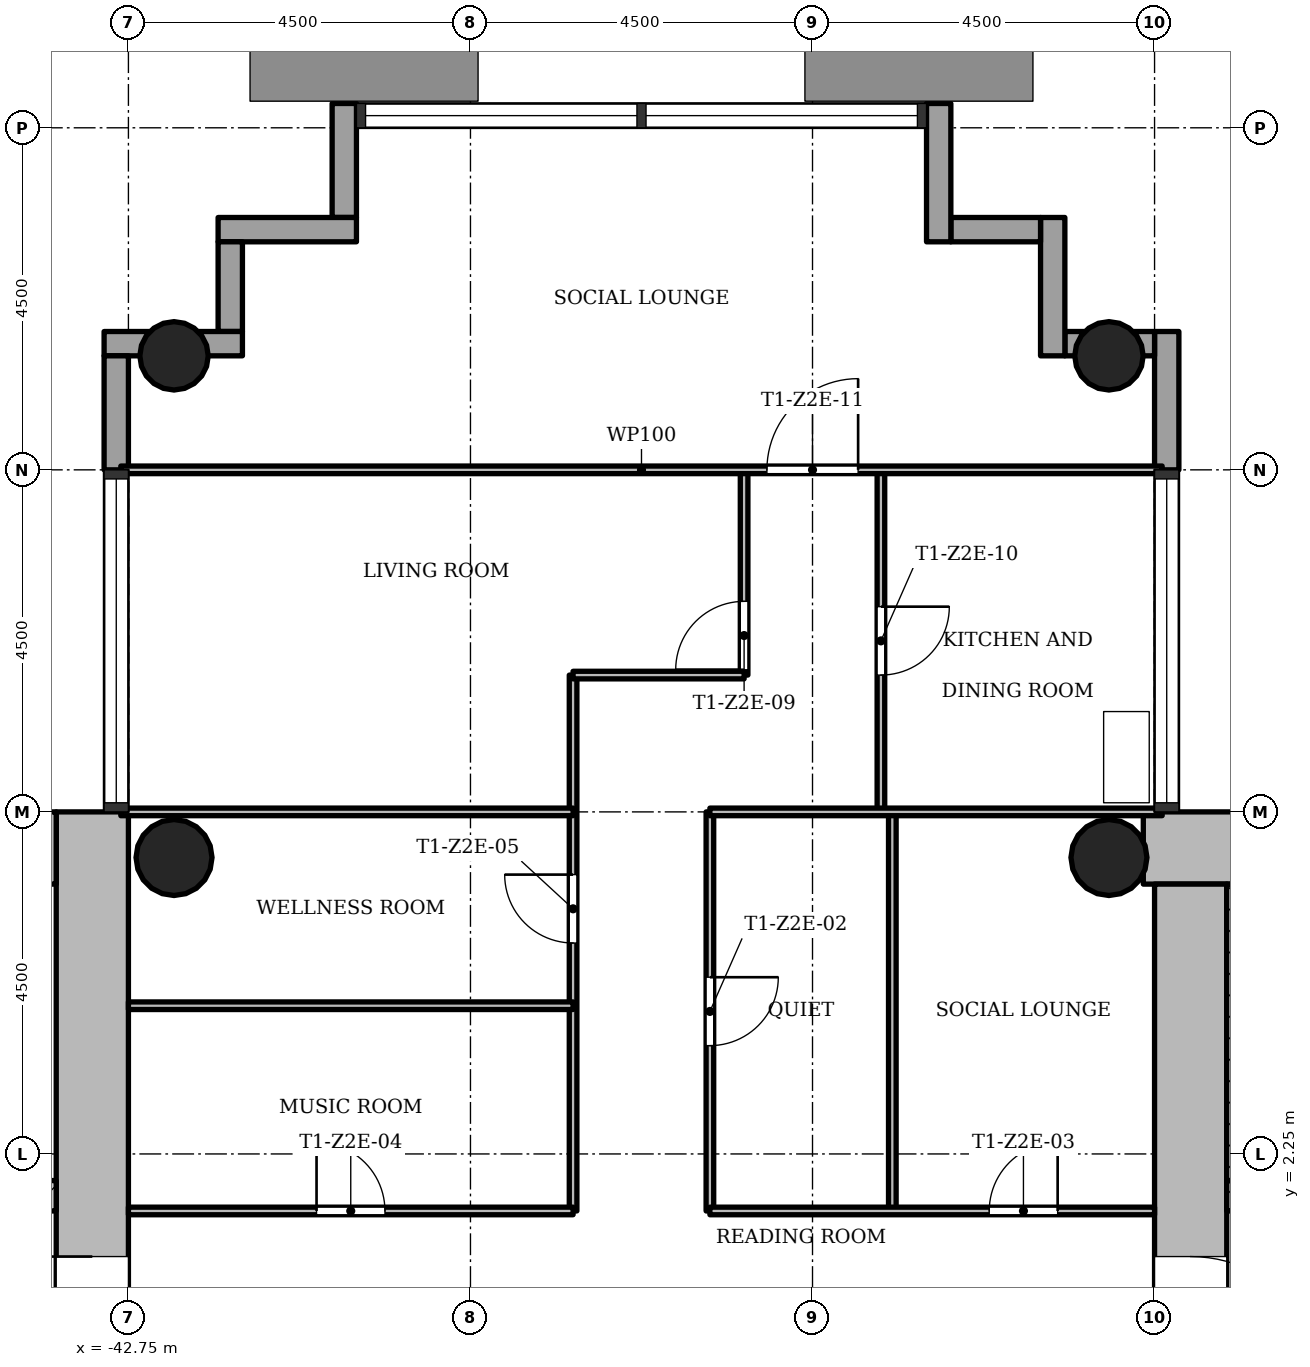
"""IFC4 building model, lengths in metres.
Left out: names, types, materials, properties, quantities, classifications, styles, units other than length and angle.
Written with IfcOpenShell. Run it as: python <this file> out.ifc"""

import sys

from ifc_helpers import new_model, si_unit, direction, frame, frame_2d, origin, origin_2d, place, context, subcontext, project, spatial, rectangle, hollow_circle, extrude, element, fill, save


model = new_model("IFC4")
c1 = context("Model", 3, precision=1e-05, world=origin(), true_north=direction((0.0, 1.0)))
c2 = subcontext(c1, "Body", "Model", "MODEL_VIEW")
j1 = project(units=[si_unit("LENGTHUNIT", "METRE"), si_unit("PLANEANGLEUNIT", "RADIAN")], contexts=[c1])
p1 = place(None, origin())
s1 = spatial("IfcSite", under=j1, at=p1, CompositionType="ELEMENT")
p2 = place(p1, origin())
s2 = spatial("IfcBuilding", under=s1, at=p2, CompositionType="ELEMENT")
p3 = place(p2, frame((0.0, 0.0, 100.4)))
s3 = spatial("IfcBuildingStorey", under=s2, at=p3, CompositionType="ELEMENT", Elevation=100.4)
p4 = place(p3, frame((-20.702, 6.275, 0.0), z_axis=(0.0, 0.0, 1.0), x_axis=(-1.0, 0.0, 0.0)))
e1 = element("IfcWall", 1, at=p4, inside=s3, PredefinedType="SHEAR", context=c2, shape_type="SweptSolid", body=[
    extrude(rectangle(XDim=8.696, YDim=0.95, at=frame_2d((4.348, 0.0))), origin(), (0.0, 0.0, 1.0), 3.4),
])
p5 = place(p3, frame((-28.775, 5.8, 0.0), z_axis=(0.0, 0.0, 1.0), x_axis=(0.0, -1.0, 0.0)))
e2 = element("IfcWall", 2, at=p5, inside=s3, PredefinedType="SHEAR", context=c2, shape_type="SweptSolid", body=[
    extrude(rectangle(XDim=12.55, YDim=0.95, at=frame_2d((6.275, 0.0))), origin(), (0.0, 0.0, 1.0), 3.4),
])
p6 = place(p5, frame((4.9, 0.0, 0.0)))
e3 = element("IfcOpeningElement", 3, at=p6, cuts=e2, PredefinedType="OPENING", context=c2, shape_type="SweptSolid", body=[
    extrude(rectangle(XDim=1.8, YDim=2.1, at=frame_2d((0.9, 1.05))), frame((0.0, 0.485, 0.0), z_axis=(0.0, -1.0, 0.0), x_axis=(1.0, 0.0, 0.0)), (0.0, 0.0, 1.0), 0.97),
])
p7 = place(p3, frame((-28.3, 1.7, 0.0), z_axis=(0.0, 0.0, 1.0), x_axis=(1.0, 0.0, 0.0)))
e4 = element("IfcWall", 4, at=p7, inside=s3, PredefinedType="SHEAR", context=c2, shape_type="SweptSolid", body=[
    extrude(rectangle(XDim=7.1, YDim=0.4, at=frame_2d((3.55, 0.0))), origin(), (0.0, 0.0, 1.0), 3.4),
])
p8 = place(p7, frame((0.7, 0.0, 0.0)))
e5 = element("IfcOpeningElement", 5, at=p8, cuts=e4, PredefinedType="OPENING", context=c2, shape_type="SweptSolid", body=[
    extrude(rectangle(XDim=0.9, YDim=2.1, at=frame_2d((0.45, 1.05))), frame((0.0, 0.21, 0.0), z_axis=(0.0, -1.0, 0.0), x_axis=(1.0, 0.0, 0.0)), (0.0, 0.0, 1.0), 0.42),
])
p9 = place(p3, frame((-43.225, -5.8, 0.0), z_axis=(0.0, 0.0, 1.0), x_axis=(0.0, 1.0, 0.0)))
e6 = element("IfcWall", 6, at=p9, inside=s3, PredefinedType="SHEAR", context=c2, shape_type="SweptSolid", body=[
    extrude(rectangle(XDim=12.55, YDim=0.95, at=frame_2d((6.275, 0.0))), origin(), (0.0, 0.0, 1.0), 3.4),
])
p10 = place(p9, frame((4.9, 0.0, 0.0)))
e7 = element("IfcOpeningElement", 7, at=p10, cuts=e6, PredefinedType="OPENING", context=c2, shape_type="SweptSolid", body=[
    extrude(rectangle(XDim=1.8, YDim=2.1, at=frame_2d((0.9, 1.05))), frame((0.0, 0.485, 0.0), z_axis=(0.0, -1.0, 0.0), x_axis=(1.0, 0.0, 0.0)), (0.0, 0.0, 1.0), 0.97),
])
p11 = place(p3, frame((-43.7, 6.275, 0.0), z_axis=(0.0, 0.0, 1.0), x_axis=(-1.0, 0.0, 0.0)))
e8 = element("IfcWall", 8, at=p11, inside=s3, PredefinedType="SHEAR", context=c2, shape_type="SweptSolid", body=[
    extrude(rectangle(XDim=8.05, YDim=0.95, at=frame_2d((4.025, 0.0))), origin(), (0.0, 0.0, 1.0), 3.4),
])
p12 = place(p3, frame((-50.8, 1.7, 0.0), z_axis=(0.0, 0.0, 1.0), x_axis=(1.0, 0.0, 0.0)))
e9 = element("IfcWall", 9, at=p12, inside=s3, PredefinedType="SHEAR", context=c2, shape_type="SweptSolid", body=[
    extrude(rectangle(XDim=7.1, YDim=0.4, at=frame_2d((3.55, 0.0))), origin(), (0.0, 0.0, 1.0), 3.4),
])
p13 = place(p12, frame((5.2, 0.0, 0.0)))
e10 = element("IfcOpeningElement", 10, at=p13, cuts=e9, PredefinedType="OPENING", context=c2, shape_type="SweptSolid", body=[
    extrude(rectangle(XDim=1.1, YDim=2.1, at=frame_2d((0.55, 1.05))), frame((0.0, 0.21, 0.0), z_axis=(0.0, -1.0, 0.0), x_axis=(1.0, 0.0, 0.0)), (0.0, 0.0, 1.0), 0.42),
])
for number, where, z_axis, x_axis in (
    (11, (-29.85, 12.75, 0.0), (0.0, 0.0, 1.0), (1.0, 0.0, 0.0)),
    (12, (-42.15, 12.75, 0.0), (0.0, 0.0, 1.0), (1.0, 0.0, 0.0)),
):
    element("IfcColumn", number, at=place(p3, frame(where, z_axis=z_axis, x_axis=x_axis)), inside=s3, PredefinedType="COLUMN", context=c2, shape_type="SweptSolid", body=[
        extrude(hollow_circle(Radius=0.45, WallThickness=0.032, at=origin_2d()), origin(), (0.0, 0.0, 1.0), 3.4),
    ])
for number, where, z_axis, x_axis in (
    (13, (-29.85, 6.15, 0.0), (0.0, 0.0, 1.0), (1.0, 0.0, 0.0)),
    (14, (-42.15, 6.15, 0.0), (0.0, 0.0, 1.0), (1.0, 0.0, 0.0)),
):
    element("IfcColumn", number, at=place(p3, frame(where, z_axis=z_axis, x_axis=x_axis)), inside=s3, PredefinedType="COLUMN", context=c2, shape_type="SweptSolid", body=[
        extrude(hollow_circle(Radius=0.5, WallThickness=0.036, at=origin_2d()), origin(), (0.0, 0.0, 1.0), 3.4),
    ])
p14 = place(p3, frame((-29.09, 11.25, -0.3), z_axis=(0.0, 0.0, 1.0), x_axis=(0.0, 1.0, 0.0)))
e15 = element("IfcWall", 15, at=p14, inside=s3, PredefinedType="STANDARD", context=c2, shape_type="SweptSolid", body=[
    extrude(rectangle(XDim=1.82, YDim=0.32, at=frame_2d((0.91, 0.0))), origin(), (0.0, 0.0, 1.0), 3.4),
])
p15 = place(p3, frame((-29.25, 12.91, -0.3), z_axis=(0.0, 0.0, 1.0), x_axis=(-1.0, 0.0, 0.0)))
e16 = element("IfcWall", 16, at=p15, inside=s3, PredefinedType="STANDARD", context=c2, shape_type="SweptSolid", body=[
    extrude(rectangle(XDim=1.18, YDim=0.32, at=frame_2d((0.59, 0.0))), origin(), (0.0, 0.0, 1.0), 3.4),
])
p16 = place(p3, frame((-30.59, 12.75, -0.3), z_axis=(0.0, 0.0, 1.0), x_axis=(0.0, 1.0, 0.0)))
e17 = element("IfcWall", 17, at=p16, inside=s3, PredefinedType="STANDARD", context=c2, shape_type="SweptSolid", body=[
    extrude(rectangle(XDim=1.82, YDim=0.32, at=frame_2d((0.91, 0.0))), origin(), (0.0, 0.0, 1.0), 3.4),
])
p17 = place(p3, frame((-30.75, 14.41, -0.3), z_axis=(0.0, 0.0, 1.0), x_axis=(-1.0, 0.0, 0.0)))
e18 = element("IfcWall", 18, at=p17, inside=s3, PredefinedType="STANDARD", context=c2, shape_type="SweptSolid", body=[
    extrude(rectangle(XDim=1.18, YDim=0.32, at=frame_2d((0.59, 0.0))), origin(), (0.0, 0.0, 1.0), 3.4),
])
p18 = place(p3, frame((-32.09, 14.25, -0.3), z_axis=(0.0, 0.0, 1.0), x_axis=(0.0, 1.0, 0.0)))
e19 = element("IfcWall", 19, at=p18, inside=s3, PredefinedType="STANDARD", context=c2, shape_type="SweptSolid", body=[
    extrude(rectangle(XDim=1.82, YDim=0.32, at=frame_2d((0.91, 0.0))), origin(), (0.0, 0.0, 1.0), 3.4),
])
p19 = place(p3, frame((-39.91, 16.07, -0.3), z_axis=(0.0, 0.0, 1.0), x_axis=(0.0, -1.0, 0.0)))
e20 = element("IfcWall", 20, at=p19, inside=s3, PredefinedType="STANDARD", context=c2, shape_type="SweptSolid", body=[
    extrude(rectangle(XDim=1.5, YDim=0.32, at=frame_2d((0.75, 0.0))), origin(), (0.0, 0.0, 1.0), 3.4),
])
p20 = place(p3, frame((-39.75, 14.41, -0.3), z_axis=(0.0, 0.0, 1.0), x_axis=(-1.0, 0.0, 0.0)))
e21 = element("IfcWall", 21, at=p20, inside=s3, PredefinedType="STANDARD", context=c2, shape_type="SweptSolid", body=[
    extrude(rectangle(XDim=1.82, YDim=0.32, at=frame_2d((0.91, 0.0))), origin(), (0.0, 0.0, 1.0), 3.4),
])
p21 = place(p3, frame((-41.41, 14.25, -0.3), z_axis=(0.0, 0.0, 1.0), x_axis=(0.0, -1.0, 0.0)))
e22 = element("IfcWall", 22, at=p21, inside=s3, PredefinedType="STANDARD", context=c2, shape_type="SweptSolid", body=[
    extrude(rectangle(XDim=1.18, YDim=0.32, at=frame_2d((0.59, 0.0))), origin(), (0.0, 0.0, 1.0), 3.4),
])
p22 = place(p3, frame((-41.25, 12.91, -0.3), z_axis=(0.0, 0.0, 1.0), x_axis=(-1.0, 0.0, 0.0)))
e23 = element("IfcWall", 23, at=p22, inside=s3, PredefinedType="STANDARD", context=c2, shape_type="SweptSolid", body=[
    extrude(rectangle(XDim=1.82, YDim=0.32, at=frame_2d((0.91, 0.0))), origin(), (0.0, 0.0, 1.0), 3.4),
])
p23 = place(p3, frame((-42.91, 12.75, -0.3), z_axis=(0.0, 0.0, 1.0), x_axis=(0.0, -1.0, 0.0)))
e24 = element("IfcWall", 24, at=p23, inside=s3, PredefinedType="STANDARD", context=c2, shape_type="SweptSolid", body=[
    extrude(rectangle(XDim=1.5, YDim=0.32, at=frame_2d((0.75, 0.0))), origin(), (0.0, 0.0, 1.0), 3.4),
])
p24 = place(p3, frame((-36.9, 1.5, 0.0), z_axis=(0.0, 0.0, 1.0), x_axis=(0.0, 1.0, 0.0)))
e25 = element("IfcWall", 25, at=p24, inside=s3, PredefinedType="PARTITIONING", context=c2, shape_type="SweptSolid", body=[
    extrude(rectangle(XDim=7.05, YDim=0.1, at=frame_2d((3.525, 0.0))), origin(), (0.0, 0.0, 1.0), 3.0),
])
p25 = place(p24, frame((3.525, 0.0, 0.0)))
e26 = element("IfcOpeningElement", 26, at=p25, cuts=e25, PredefinedType="OPENING", context=c2, shape_type="SweptSolid", body=[
    extrude(rectangle(XDim=0.9, YDim=2.1, at=frame_2d((0.45, 1.05))), frame((0.0, 0.06, 0.0), z_axis=(0.0, -1.0, 0.0), x_axis=(1.0, 0.0, 0.0)), (0.0, 0.0, 1.0), 0.12),
])
p26 = place(p3, frame((-35.1, 1.5, 0.0), z_axis=(0.0, 0.0, 1.0), x_axis=(0.0, 1.0, 0.0)))
e27 = element("IfcWall", 27, at=p26, inside=s3, PredefinedType="PARTITIONING", context=c2, shape_type="SweptSolid", body=[
    extrude(rectangle(XDim=5.25, YDim=0.1, at=frame_2d((2.625, 0.0))), origin(), (0.0, 0.0, 1.0), 3.0),
])
p27 = place(p26, frame((2.175, 0.0, 0.0)))
e28 = element("IfcOpeningElement", 28, at=p27, cuts=e27, PredefinedType="OPENING", context=c2, shape_type="SweptSolid", body=[
    extrude(rectangle(XDim=0.9, YDim=2.1, at=frame_2d((0.45, 1.05))), frame((0.0, 0.06, 0.0), z_axis=(0.0, -1.0, 0.0), x_axis=(1.0, 0.0, 0.0)), (0.0, 0.0, 1.0), 0.12),
])
p28 = place(p3, frame((-34.65, 8.55, 0.0), z_axis=(0.0, 0.0, 1.0), x_axis=(0.0, 1.0, 0.0)))
e29 = element("IfcWall", 29, at=p28, inside=s3, PredefinedType="PARTITIONING", context=c2, shape_type="SweptSolid", body=[
    extrude(rectangle(XDim=2.7, YDim=0.1, at=frame_2d((1.35, 0.0))), origin(), (0.0, 0.0, 1.0), 3.0),
])
p29 = place(p28, frame((0.07, 0.0, 0.0)))
e30 = element("IfcOpeningElement", 30, at=p29, cuts=e29, PredefinedType="OPENING", context=c2, shape_type="SweptSolid", body=[
    extrude(rectangle(XDim=0.9, YDim=2.1, at=frame_2d((0.45, 1.05))), frame((0.0, 0.06, 0.0), z_axis=(0.0, -1.0, 0.0), x_axis=(1.0, 0.0, 0.0)), (0.0, 0.0, 1.0), 0.12),
])
p30 = place(p3, frame((-32.85, 6.75, 0.0), z_axis=(0.0, 0.0, 1.0), x_axis=(0.0, 1.0, 0.0)))
e31 = element("IfcWall", 31, at=p30, inside=s3, PredefinedType="PARTITIONING", context=c2, shape_type="SweptSolid", body=[
    extrude(rectangle(XDim=4.5, YDim=0.1, at=frame_2d((2.25, 0.0))), origin(), (0.0, 0.0, 1.0), 3.0),
])
p31 = place(p30, frame((1.8, 0.0, 0.0)))
e32 = element("IfcOpeningElement", 32, at=p31, cuts=e31, PredefinedType="OPENING", context=c2, shape_type="SweptSolid", body=[
    extrude(rectangle(XDim=0.9, YDim=2.1, at=frame_2d((0.45, 1.05))), frame((0.0, 0.06, 0.0), z_axis=(0.0, -1.0, 0.0), x_axis=(1.0, 0.0, 0.0)), (0.0, 0.0, 1.0), 0.12),
])
p32 = place(p3, frame((-32.7, 1.5, 0.0), z_axis=(0.0, 0.0, 1.0), x_axis=(0.0, 1.0, 0.0)))
e33 = element("IfcWall", 33, at=p32, inside=s3, PredefinedType="PARTITIONING", context=c2, shape_type="SweptSolid", body=[
    extrude(rectangle(XDim=5.25, YDim=0.1, at=frame_2d((2.625, 0.0))), origin(), (0.0, 0.0, 1.0), 3.0),
])
p33 = place(p3, frame((-42.75, 1.5, 0.0), z_axis=(0.0, 0.0, 1.0), x_axis=(1.0, 0.0, 0.0)))
e34 = element("IfcWall", 34, at=p33, inside=s3, PredefinedType="PARTITIONING", context=c2, shape_type="SweptSolid", body=[
    extrude(rectangle(XDim=5.85, YDim=0.1, at=frame_2d((2.925, 0.0))), origin(), (0.0, 0.0, 1.0), 3.0),
])
p34 = place(p33, frame((2.475, 0.0, 0.0)))
e35 = element("IfcOpeningElement", 35, at=p34, cuts=e34, PredefinedType="OPENING", context=c2, shape_type="SweptSolid", body=[
    extrude(rectangle(XDim=0.9, YDim=2.1, at=frame_2d((0.45, 1.05))), frame((0.0, 0.06, 0.0), z_axis=(0.0, -1.0, 0.0), x_axis=(1.0, 0.0, 0.0)), (0.0, 0.0, 1.0), 0.12),
])
p35 = place(p3, frame((-35.1, 1.5, 0.0), z_axis=(0.0, 0.0, 1.0), x_axis=(1.0, 0.0, 0.0)))
e36 = element("IfcWall", 36, at=p35, inside=s3, PredefinedType="PARTITIONING", context=c2, shape_type="SweptSolid", body=[
    extrude(rectangle(XDim=5.85, YDim=0.1, at=frame_2d((2.925, 0.0))), origin(), (0.0, 0.0, 1.0), 3.0),
])
p36 = place(p35, frame((3.675, 0.0, 0.0)))
e37 = element("IfcOpeningElement", 37, at=p36, cuts=e36, PredefinedType="OPENING", context=c2, shape_type="SweptSolid", body=[
    extrude(rectangle(XDim=0.9, YDim=2.1, at=frame_2d((0.45, 1.05))), frame((0.0, 0.06, 0.0), z_axis=(0.0, -1.0, 0.0), x_axis=(1.0, 0.0, 0.0)), (0.0, 0.0, 1.0), 0.12),
])
p37 = place(p3, frame((-42.75, 4.2, 0.0), z_axis=(0.0, 0.0, 1.0), x_axis=(1.0, 0.0, 0.0)))
e38 = element("IfcWall", 38, at=p37, inside=s3, PredefinedType="PARTITIONING", context=c2, shape_type="SweptSolid", body=[
    extrude(rectangle(XDim=5.85, YDim=0.1, at=frame_2d((2.925, 0.0))), origin(), (0.0, 0.0, 1.0), 3.0),
])
for number, where, z_axis, x_axis in (
    (39, (-42.85, 6.75, 0.0), (0.0, 0.0, 1.0), (1.0, 0.0, 0.0)),
    (40, (-35.1, 6.75, 0.0), (0.0, 0.0, 1.0), (1.0, 0.0, 0.0)),
):
    element("IfcWall", number, at=place(p3, frame(where, z_axis=z_axis, x_axis=x_axis)), inside=s3, PredefinedType="PARTITIONING", context=c2, shape_type="SweptSolid", body=[
        extrude(rectangle(XDim=5.95, YDim=0.1, at=frame_2d((2.975, 0.0))), origin(), (0.0, 0.0, 1.0), 3.0),
    ])
p38 = place(p3, frame((-36.9, 8.55, 0.0), z_axis=(0.0, 0.0, 1.0), x_axis=(1.0, 0.0, 0.0)))
e41 = element("IfcWall", 41, at=p38, inside=s3, PredefinedType="PARTITIONING", context=c2, shape_type="SweptSolid", body=[
    extrude(rectangle(XDim=2.25, YDim=0.1, at=frame_2d((1.125, 0.0))), origin(), (0.0, 0.0, 1.0), 3.0),
])
p39 = place(p3, frame((-42.85, 11.25, 0.0), z_axis=(0.0, 0.0, 1.0), x_axis=(1.0, 0.0, 0.0)))
e42 = element("IfcWall", 42, at=p39, inside=s3, PredefinedType="PARTITIONING", context=c2, shape_type="SweptSolid", body=[
    extrude(rectangle(XDim=13.7, YDim=0.1, at=frame_2d((6.85, 0.0))), origin(), (0.0, 0.0, 1.0), 3.0),
])
p40 = place(p39, frame((8.5, 0.0, 0.0)))
e43 = element("IfcOpeningElement", 43, at=p40, cuts=e42, PredefinedType="OPENING", context=c2, shape_type="SweptSolid", body=[
    extrude(rectangle(XDim=1.2, YDim=2.1, at=frame_2d((0.6, 1.05))), frame((0.0, 0.06, 0.0), z_axis=(0.0, -1.0, 0.0), x_axis=(1.0, 0.0, 0.0)), (0.0, 0.0, 1.0), 0.12),
])
p41 = place(p3, frame((-28.175, 1.9, 0.0), z_axis=(0.0, 0.0, 1.0), x_axis=(0.0, 1.0, 0.0)))
e44 = element("IfcWall", 44, at=p41, inside=s3, PredefinedType="SHEAR", context=c2, shape_type="SweptSolid", body=[
    extrude(rectangle(XDim=3.9, YDim=0.25, at=frame_2d((1.95, 0.0))), origin(), (0.0, 0.0, 1.0), 3.4),
])
p42 = place(p27, origin())
e45 = element("IfcDoor", 45, at=p42, inside=s3, OperationType="SINGLE_SWING_RIGHT", PredefinedType="DOOR", context=c2, shape_type="SweptSolid", body=[
    extrude(rectangle(XDim=0.9, YDim=2.1, at=frame_2d((0.45, 1.05))), frame((0.0, 0.025, 0.0), z_axis=(0.0, -1.0, 0.0), x_axis=(1.0, 0.0, 0.0)), (0.0, 0.0, 1.0), 0.05),
])
fill(e28, e45)
p43 = place(p36, origin())
e46 = element("IfcDoor", 46, at=p43, inside=s3, OperationType="SINGLE_SWING_LEFT", PredefinedType="DOOR", context=c2, shape_type="SweptSolid", body=[
    extrude(rectangle(XDim=0.9, YDim=2.1, at=frame_2d((0.45, 1.05))), frame((0.0, 0.025, 0.0), z_axis=(0.0, -1.0, 0.0), x_axis=(1.0, 0.0, 0.0)), (0.0, 0.0, 1.0), 0.05),
])
fill(e37, e46)
p44 = place(p34, origin())
e47 = element("IfcDoor", 47, at=p44, inside=s3, OperationType="SINGLE_SWING_RIGHT", PredefinedType="DOOR", context=c2, shape_type="SweptSolid", body=[
    extrude(rectangle(XDim=0.9, YDim=2.1, at=frame_2d((0.45, 1.05))), frame((0.0, 0.025, 0.0), z_axis=(0.0, -1.0, 0.0), x_axis=(1.0, 0.0, 0.0)), (0.0, 0.0, 1.0), 0.05),
])
fill(e35, e47)
p45 = place(p25, origin())
e48 = element("IfcDoor", 48, at=p45, inside=s3, OperationType="SINGLE_SWING_LEFT", PredefinedType="DOOR", context=c2, shape_type="SweptSolid", body=[
    extrude(rectangle(XDim=0.9, YDim=2.1, at=frame_2d((0.45, 1.05))), frame((0.0, 0.025, 0.0), z_axis=(0.0, -1.0, 0.0), x_axis=(1.0, 0.0, 0.0)), (0.0, 0.0, 1.0), 0.05),
])
fill(e26, e48)
p46 = place(p29, origin())
e49 = element("IfcDoor", 49, at=p46, inside=s3, OperationType="SINGLE_SWING_RIGHT", PredefinedType="DOOR", context=c2, shape_type="SweptSolid", body=[
    extrude(rectangle(XDim=0.9, YDim=2.1, at=frame_2d((0.45, 1.05))), frame((0.0, 0.025, 0.0), z_axis=(0.0, -1.0, 0.0), x_axis=(1.0, 0.0, 0.0)), (0.0, 0.0, 1.0), 0.05),
])
fill(e30, e49)
p47 = place(p31, origin())
e50 = element("IfcDoor", 50, at=p47, inside=s3, OperationType="SINGLE_SWING_RIGHT", PredefinedType="DOOR", context=c2, shape_type="SweptSolid", body=[
    extrude(rectangle(XDim=0.9, YDim=2.1, at=frame_2d((0.45, 1.05))), frame((0.0, 0.025, 0.0), z_axis=(0.0, -1.0, 0.0), x_axis=(1.0, 0.0, 0.0)), (0.0, 0.0, 1.0), 0.05),
])
fill(e32, e50)
p48 = place(p40, origin())
e51 = element("IfcDoor", 51, at=p48, inside=s3, OperationType="SINGLE_SWING_LEFT", PredefinedType="DOOR", context=c2, shape_type="SweptSolid", body=[
    extrude(rectangle(XDim=1.2, YDim=2.1, at=frame_2d((0.6, 1.05))), frame((0.0, 0.025, 0.0), z_axis=(0.0, -1.0, 0.0), x_axis=(1.0, 0.0, 0.0)), (0.0, 0.0, 1.0), 0.05),
])
fill(e43, e51)
p49 = place(p6, origin())
e52 = element("IfcDoor", 52, at=p49, inside=s3, OperationType="SINGLE_SWING_LEFT", PredefinedType="DOOR", context=c2, shape_type="SweptSolid", body=[
    extrude(rectangle(XDim=1.8, YDim=2.1, at=frame_2d((0.9, 1.05))), frame((0.0, 0.025, 0.0), z_axis=(0.0, -1.0, 0.0), x_axis=(1.0, 0.0, 0.0)), (0.0, 0.0, 1.0), 0.05),
])
fill(e3, e52)
p50 = place(p10, origin())
e53 = element("IfcDoor", 53, at=p50, inside=s3, OperationType="SINGLE_SWING_LEFT", PredefinedType="DOOR", context=c2, shape_type="SweptSolid", body=[
    extrude(rectangle(XDim=1.8, YDim=2.1, at=frame_2d((0.9, 1.05))), frame((0.0, 0.025, 0.0), z_axis=(0.0, -1.0, 0.0), x_axis=(1.0, 0.0, 0.0)), (0.0, 0.0, 1.0), 0.05),
])
fill(e7, e53)
save(model, sys.argv[1])
